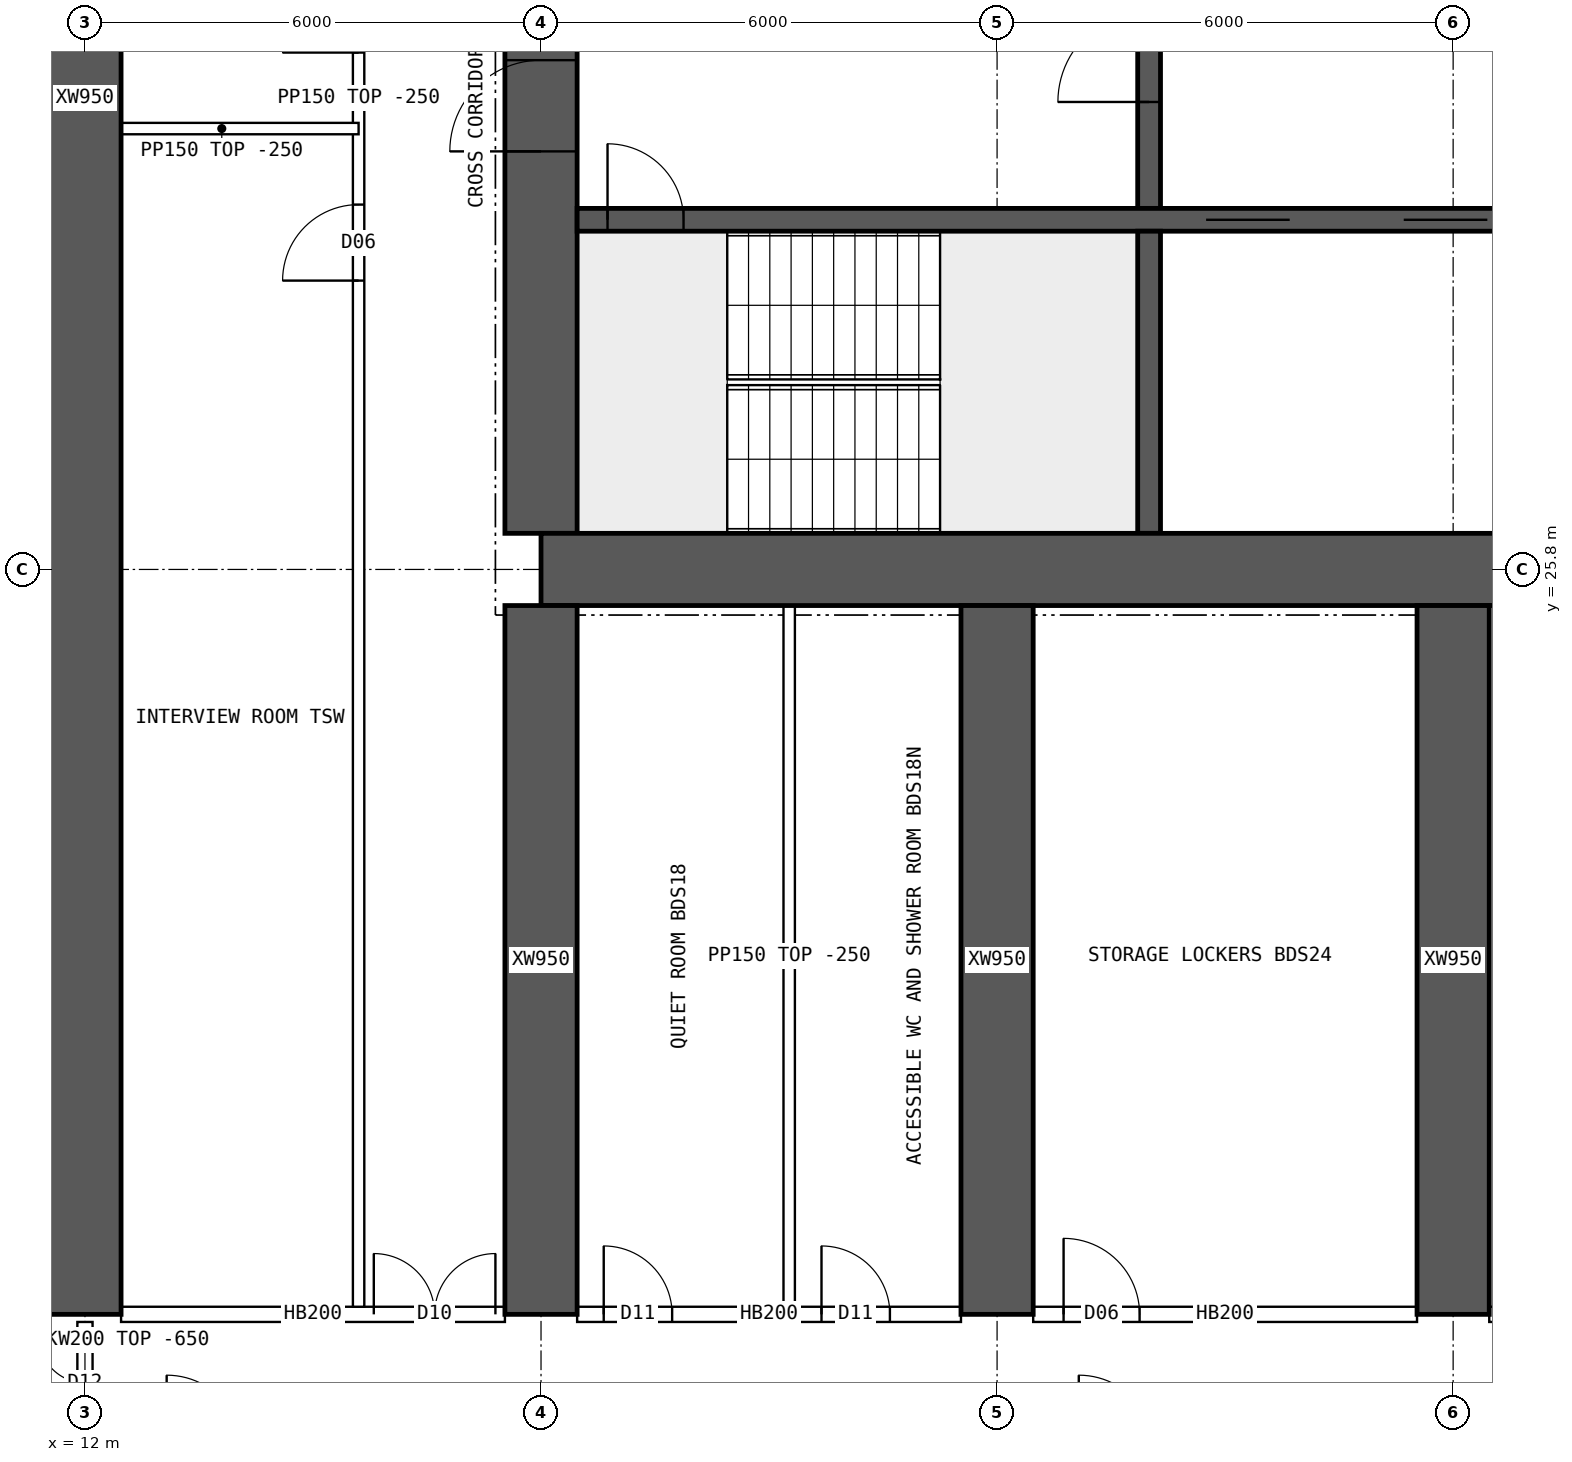
"""IFC4 building model, lengths in metres.
Left out: names, types, materials, properties, quantities, classifications, styles, units other than length and angle.
Written with IfcOpenShell. Run it as: python <this file> out.ifc"""

import sys

from ifc_helpers import new_model, si_unit, direction, frame, frame_2d, origin, place, context, subcontext, project, spatial, polyline, rectangle, outline, extrude, element, fill, save


model = new_model("IFC4")
c1 = context("Model", 3, precision=1e-05, world=origin(), true_north=direction((0.0, 1.0)))
c2 = subcontext(c1, "Body", "Model", "MODEL_VIEW")
j1 = project(units=[si_unit("LENGTHUNIT", "METRE"), si_unit("PLANEANGLEUNIT", "RADIAN")], contexts=[c1])
p1 = place(None, origin())
s1 = spatial("IfcSite", under=j1, at=p1, CompositionType="ELEMENT")
p2 = place(p1, origin())
s2 = spatial("IfcBuilding", under=s1, at=p2, CompositionType="ELEMENT")
p3 = place(p2, frame((0.0, 0.0, 125.65)))
s3 = spatial("IfcBuildingStorey", under=s2, at=p3, CompositionType="ELEMENT", Elevation=125.65)
p4 = place(p3, frame((18.0, 25.8, 0.0), z_axis=(0.0, 0.0, 1.0), x_axis=(1.0, 0.0, 0.0)))
e1 = element("IfcWall", 1, at=p4, inside=s3, PredefinedType="SHEAR", context=c2, shape_type="SweptSolid", body=[
    extrude(rectangle(XDim=48.0, YDim=0.95, at=frame_2d((24.0, 0.0))), origin(), (0.0, 0.0, 1.0), 3.75),
])
p5 = place(p3, frame((18.0, 26.275, 0.0), z_axis=(0.0, 0.0, 1.0), x_axis=(0.0, 1.0, 0.0)))
e2 = element("IfcWall", 2, at=p5, inside=s3, PredefinedType="SHEAR", context=c2, shape_type="SweptSolid", body=[
    extrude(rectangle(XDim=11.45, YDim=0.95, at=frame_2d((5.725, 0.0))), origin(), (0.0, 0.0, 1.0), 3.75),
])
p6 = place(p5, frame((5.025, 0.0, 0.0)))
e3 = element("IfcOpeningElement", 3, at=p6, cuts=e2, PredefinedType="OPENING", context=c2, shape_type="SweptSolid", body=[
    extrude(rectangle(XDim=1.2, YDim=2.1, at=frame_2d((0.6, 1.05))), frame((0.0, 0.485, 0.0), z_axis=(0.0, -1.0, 0.0), x_axis=(1.0, 0.0, 0.0)), (0.0, 0.0, 1.0), 0.97),
])
p7 = place(p3, frame((18.475, 30.4, 0.0), z_axis=(0.0, 0.0, 1.0), x_axis=(1.0, 0.0, 0.0)))
e4 = element("IfcWall", 4, at=p7, inside=s3, PredefinedType="SHEAR", context=c2, shape_type="SweptSolid", body=[
    extrude(rectangle(XDim=47.05, YDim=0.3, at=frame_2d((23.525, 0.0))), origin(), (0.0, 0.0, 1.0), 3.75),
])
p8 = place(p7, frame((0.4, 0.0, 0.0)))
e5 = element("IfcOpeningElement", 5, at=p8, cuts=e4, PredefinedType="OPENING", context=c2, shape_type="SweptSolid", body=[
    extrude(rectangle(XDim=1.0, YDim=2.1, at=frame_2d((0.5, 1.05))), frame((0.0, 0.16, 0.0), z_axis=(0.0, -1.0, 0.0), x_axis=(1.0, 0.0, 0.0)), (0.0, 0.0, 1.0), 0.32),
])
p9 = place(p7, frame((45.65, 0.0, 0.0)))
e6 = element("IfcOpeningElement", 6, at=p9, cuts=e4, PredefinedType="OPENING", context=c2, shape_type="SweptSolid", body=[
    extrude(rectangle(XDim=1.0, YDim=2.1, at=frame_2d((0.5, 1.05))), frame((0.0, 0.16, 0.0), z_axis=(0.0, -1.0, 0.0), x_axis=(1.0, 0.0, 0.0)), (0.0, 0.0, 1.0), 0.32),
])
p10 = place(p7, frame((8.275, 0.0, 0.0)))
e7 = element("IfcOpeningElement", 7, at=p10, cuts=e4, PredefinedType="OPENING", context=c2, shape_type="SweptSolid", body=[
    extrude(rectangle(XDim=1.1, YDim=2.1, at=frame_2d((0.55, 1.05))), frame((0.0, 0.16, 0.0), z_axis=(0.0, -1.0, 0.0), x_axis=(1.0, 0.0, 0.0)), (0.0, 0.0, 1.0), 0.32),
])
p11 = place(p7, frame((10.875, 0.0, 0.0)))
e8 = element("IfcOpeningElement", 8, at=p11, cuts=e4, PredefinedType="OPENING", context=c2, shape_type="SweptSolid", body=[
    extrude(rectangle(XDim=1.1, YDim=2.1, at=frame_2d((0.55, 1.05))), frame((0.0, 0.16, 0.0), z_axis=(0.0, -1.0, 0.0), x_axis=(1.0, 0.0, 0.0)), (0.0, 0.0, 1.0), 0.32),
])
p12 = place(p7, frame((13.475, 0.0, 0.0)))
e9 = element("IfcOpeningElement", 9, at=p12, cuts=e4, PredefinedType="OPENING", context=c2, shape_type="SweptSolid", body=[
    extrude(rectangle(XDim=1.1, YDim=2.1, at=frame_2d((0.55, 1.05))), frame((0.0, 0.16, 0.0), z_axis=(0.0, -1.0, 0.0), x_axis=(1.0, 0.0, 0.0)), (0.0, 0.0, 1.0), 0.32),
])
p13 = place(p7, frame((16.075, 0.0, 0.0)))
e10 = element("IfcOpeningElement", 10, at=p13, cuts=e4, PredefinedType="OPENING", context=c2, shape_type="SweptSolid", body=[
    extrude(rectangle(XDim=1.1, YDim=2.1, at=frame_2d((0.55, 1.05))), frame((0.0, 0.16, 0.0), z_axis=(0.0, -1.0, 0.0), x_axis=(1.0, 0.0, 0.0)), (0.0, 0.0, 1.0), 0.32),
])
p14 = place(p7, frame((18.85, 0.0, 0.0)))
e11 = element("IfcOpeningElement", 11, at=p14, cuts=e4, PredefinedType="OPENING", context=c2, shape_type="SweptSolid", body=[
    extrude(rectangle(XDim=0.9, YDim=2.1, at=frame_2d((0.45, 1.05))), frame((0.0, 0.16, 0.0), z_axis=(0.0, -1.0, 0.0), x_axis=(1.0, 0.0, 0.0)), (0.0, 0.0, 1.0), 0.32),
])
p15 = place(p7, frame((30.142, 0.0, 0.0)))
e12 = element("IfcOpeningElement", 12, at=p15, cuts=e4, PredefinedType="OPENING", context=c2, shape_type="SweptSolid", body=[
    extrude(rectangle(XDim=1.1, YDim=2.1, at=frame_2d((0.55, 1.05))), frame((0.0, 0.16, 0.0), z_axis=(0.0, -1.0, 0.0), x_axis=(1.0, 0.0, 0.0)), (0.0, 0.0, 1.0), 0.32),
])
p16 = place(p7, frame((33.675, 0.0, 0.0)))
e13 = element("IfcOpeningElement", 13, at=p16, cuts=e4, PredefinedType="OPENING", context=c2, shape_type="SweptSolid", body=[
    extrude(rectangle(XDim=1.1, YDim=2.1, at=frame_2d((0.55, 1.05))), frame((0.0, 0.16, 0.0), z_axis=(0.0, -1.0, 0.0), x_axis=(1.0, 0.0, 0.0)), (0.0, 0.0, 1.0), 0.32),
])
p17 = place(p7, frame((37.208, 0.0, 0.0)))
e14 = element("IfcOpeningElement", 14, at=p17, cuts=e4, PredefinedType="OPENING", context=c2, shape_type="SweptSolid", body=[
    extrude(rectangle(XDim=1.1, YDim=2.1, at=frame_2d((0.55, 1.05))), frame((0.0, 0.16, 0.0), z_axis=(0.0, -1.0, 0.0), x_axis=(1.0, 0.0, 0.0)), (0.0, 0.0, 1.0), 0.32),
])
p18 = place(p3, frame((26.0, 26.275, 0.0), z_axis=(0.0, 0.0, 1.0), x_axis=(0.0, 1.0, 0.0)))
e15 = element("IfcWall", 15, at=p18, inside=s3, PredefinedType="SHEAR", context=c2, shape_type="SweptSolid", body=[
    extrude(rectangle(XDim=3.975, YDim=0.3, at=frame_2d((1.988, 0.0))), origin(), (0.0, 0.0, 1.0), 3.75),
])
p19 = place(p3, frame((26.0, 30.55, 0.0), z_axis=(0.0, 0.0, 1.0), x_axis=(0.0, 1.0, 0.0)))
e16 = element("IfcWall", 16, at=p19, inside=s3, PredefinedType="SHEAR", context=c2, shape_type="SweptSolid", body=[
    extrude(rectangle(XDim=3.9, YDim=0.3, at=frame_2d((1.95, 0.0))), origin(), (0.0, 0.0, 1.0), 3.75),
])
p20 = place(p19, frame((1.4, 0.0, 0.0)))
e17 = element("IfcOpeningElement", 17, at=p20, cuts=e16, PredefinedType="OPENING", context=c2, shape_type="SweptSolid", body=[
    extrude(rectangle(XDim=1.2, YDim=2.1, at=frame_2d((0.6, 1.05))), frame((0.0, 0.16, 0.0), z_axis=(0.0, -1.0, 0.0), x_axis=(1.0, 0.0, 0.0)), (0.0, 0.0, 1.0), 0.32),
])
p21 = place(p3, frame((12.0, 16.0, 0.0), z_axis=(0.0, 0.0, 1.0), x_axis=(0.0, 1.0, 0.0)))
e18 = element("IfcWall", 18, at=p21, inside=s3, PredefinedType="SHEAR", context=c2, shape_type="SweptSolid", body=[
    extrude(rectangle(XDim=32.0, YDim=0.95, at=frame_2d((16.0, 0.0))), origin(), (0.0, 0.0, 1.0), 3.75),
])
for number, where, z_axis, x_axis in (
    (19, (18.0, 16.0, 0.0), (0.0, 0.0, 1.0), (0.0, 1.0, 0.0)),
    (20, (24.0, 16.0, 0.0), (0.0, 0.0, 1.0), (0.0, 1.0, 0.0)),
    (21, (30.0, 16.0, 0.0), (0.0, 0.0, 1.0), (0.0, 1.0, 0.0)),
):
    element("IfcWall", number, at=place(p3, frame(where, z_axis=z_axis, x_axis=x_axis)), inside=s3, PredefinedType="SHEAR", context=c2, shape_type="SweptSolid", body=[
        extrude(rectangle(XDim=9.325, YDim=0.95, at=frame_2d((4.663, 0.0))), origin(), (0.0, 0.0, 1.0), 3.75),
    ])
p22 = place(p3, frame((12.475, 16.0, 0.0), z_axis=(0.0, 0.0, 1.0), x_axis=(1.0, 0.0, 0.0)))
e22 = element("IfcWall", 22, at=p22, inside=s3, PredefinedType="SOLIDWALL", context=c2, shape_type="SweptSolid", body=[
    extrude(rectangle(XDim=5.05, YDim=0.2, at=frame_2d((2.525, 0.0))), origin(), (0.0, 0.0, 1.0), 3.5),
])
p23 = place(p22, frame((3.325, 0.0, 0.0)))
e23 = element("IfcOpeningElement", 23, at=p23, cuts=e22, PredefinedType="OPENING", context=c2, shape_type="SweptSolid", body=[
    extrude(rectangle(XDim=1.6, YDim=2.1, at=frame_2d((0.8, 1.05))), frame((0.0, 0.11, 0.0), z_axis=(0.0, -1.0, 0.0), x_axis=(1.0, 0.0, 0.0)), (0.0, 0.0, 1.0), 0.22),
])
p24 = place(p3, frame((18.475, 16.0, 0.0), z_axis=(0.0, 0.0, 1.0), x_axis=(1.0, 0.0, 0.0)))
e24 = element("IfcWall", 24, at=p24, inside=s3, PredefinedType="SOLIDWALL", context=c2, shape_type="SweptSolid", body=[
    extrude(rectangle(XDim=5.05, YDim=0.2, at=frame_2d((2.525, 0.0))), origin(), (0.0, 0.0, 1.0), 3.5),
])
p25 = place(p24, frame((0.35, 0.0, 0.0)))
e25 = element("IfcOpeningElement", 25, at=p25, cuts=e24, PredefinedType="OPENING", context=c2, shape_type="SweptSolid", body=[
    extrude(rectangle(XDim=0.9, YDim=2.1, at=frame_2d((0.45, 1.05))), frame((0.0, 0.11, 0.0), z_axis=(0.0, -1.0, 0.0), x_axis=(1.0, 0.0, 0.0)), (0.0, 0.0, 1.0), 0.22),
])
p26 = place(p24, frame((3.215, 0.0, 0.0)))
e26 = element("IfcOpeningElement", 26, at=p26, cuts=e24, PredefinedType="OPENING", context=c2, shape_type="SweptSolid", body=[
    extrude(rectangle(XDim=0.9, YDim=2.1, at=frame_2d((0.45, 1.05))), frame((0.0, 0.11, 0.0), z_axis=(0.0, -1.0, 0.0), x_axis=(1.0, 0.0, 0.0)), (0.0, 0.0, 1.0), 0.22),
])
p27 = place(p3, frame((24.475, 16.0, 0.0), z_axis=(0.0, 0.0, 1.0), x_axis=(1.0, 0.0, 0.0)))
e27 = element("IfcWall", 27, at=p27, inside=s3, PredefinedType="SOLIDWALL", context=c2, shape_type="SweptSolid", body=[
    extrude(rectangle(XDim=5.05, YDim=0.2, at=frame_2d((2.525, 0.0))), origin(), (0.0, 0.0, 1.0), 3.5),
])
p28 = place(p27, frame((0.4, 0.0, 0.0)))
e28 = element("IfcOpeningElement", 28, at=p28, cuts=e27, PredefinedType="OPENING", context=c2, shape_type="SweptSolid", body=[
    extrude(rectangle(XDim=1.0, YDim=2.1, at=frame_2d((0.5, 1.05))), frame((0.0, 0.11, 0.0), z_axis=(0.0, -1.0, 0.0), x_axis=(1.0, 0.0, 0.0)), (0.0, 0.0, 1.0), 0.22),
])
p29 = place(p3, frame((30.475, 16.0, 0.0), z_axis=(0.0, 0.0, 1.0), x_axis=(1.0, 0.0, 0.0)))
e29 = element("IfcWall", 29, at=p29, inside=s3, PredefinedType="SOLIDWALL", context=c2, shape_type="SweptSolid", body=[
    extrude(rectangle(XDim=5.05, YDim=0.2, at=frame_2d((2.525, 0.0))), origin(), (0.0, 0.0, 1.0), 3.5),
])
p30 = place(p29, frame((0.35, 0.0, 0.0)))
e30 = element("IfcOpeningElement", 30, at=p30, cuts=e29, PredefinedType="OPENING", context=c2, shape_type="SweptSolid", body=[
    extrude(rectangle(XDim=0.9, YDim=2.1, at=frame_2d((0.45, 1.05))), frame((0.0, 0.11, 0.0), z_axis=(0.0, -1.0, 0.0), x_axis=(1.0, 0.0, 0.0)), (0.0, 0.0, 1.0), 0.22),
])
p31 = place(p29, frame((2.655, 0.0, 0.0)))
e31 = element("IfcOpeningElement", 31, at=p31, cuts=e29, PredefinedType="OPENING", context=c2, shape_type="SweptSolid", body=[
    extrude(rectangle(XDim=0.9, YDim=2.1, at=frame_2d((0.45, 1.05))), frame((0.0, 0.11, 0.0), z_axis=(0.0, -1.0, 0.0), x_axis=(1.0, 0.0, 0.0)), (0.0, 0.0, 1.0), 0.22),
])
p32 = place(p3, frame((21.265, 16.1, 0.0), z_axis=(0.0, 0.0, 1.0), x_axis=(0.0, 1.0, 0.0)))
e32 = element("IfcWall", 32, at=p32, inside=s3, PredefinedType="PARTITIONING", context=c2, shape_type="SweptSolid", body=[
    extrude(rectangle(XDim=9.225, YDim=0.15, at=frame_2d((4.612, 0.0))), origin(), (0.0, 0.0, 1.0), 3.5),
])
p33 = place(p3, frame((15.6, 16.1, 0.0), z_axis=(0.0, 0.0, 1.0), x_axis=(0.0, 1.0, 0.0)))
e33 = element("IfcWall", 33, at=p33, inside=s3, PredefinedType="PARTITIONING", context=c2, shape_type="SweptSolid", body=[
    extrude(rectangle(XDim=31.8, YDim=0.15, at=frame_2d((15.9, 0.0))), origin(), (0.0, 0.0, 1.0), 3.5),
])
p34 = place(p33, frame((13.5, 0.0, 0.0)))
e34 = element("IfcOpeningElement", 34, at=p34, cuts=e33, PredefinedType="OPENING", context=c2, shape_type="SweptSolid", body=[
    extrude(rectangle(XDim=1.0, YDim=2.1, at=frame_2d((0.5, 1.05))), frame((0.0, 0.085, 0.0), z_axis=(0.0, -1.0, 0.0), x_axis=(1.0, 0.0, 0.0)), (0.0, 0.0, 1.0), 0.17),
])
p35 = place(p33, frame((16.5, 0.0, 0.0)))
e35 = element("IfcOpeningElement", 35, at=p35, cuts=e33, PredefinedType="OPENING", context=c2, shape_type="SweptSolid", body=[
    extrude(rectangle(XDim=1.0, YDim=2.1, at=frame_2d((0.5, 1.05))), frame((0.0, 0.085, 0.0), z_axis=(0.0, -1.0, 0.0), x_axis=(1.0, 0.0, 0.0)), (0.0, 0.0, 1.0), 0.17),
])
p36 = place(p3, frame((12.0, 31.6, 0.0), z_axis=(0.0, 0.0, 1.0), x_axis=(1.0, 0.0, 0.0)))
e36 = element("IfcWall", 36, at=p36, inside=s3, PredefinedType="PARTITIONING", context=c2, shape_type="SweptSolid", body=[
    extrude(rectangle(XDim=3.6, YDim=0.15, at=frame_2d((1.8, 0.0))), origin(), (0.0, 0.0, 1.0), 3.5),
])
p37 = place(p3, frame((3.905, 30.85, 0.0), z_axis=(0.0, 0.0, 1.0), x_axis=(1.0, 0.0, 0.0)))
e37 = element("IfcWall", 37, at=p37, inside=s3, PredefinedType="PARTITIONING", context=c2, shape_type="SweptSolid", body=[
    extrude(outline(polyline([(0.0, 0.0), (8.02, 0.0), (8.02, 3.5), (2.397, 3.5), (2.395, 3.05), (1.797, 3.05), (1.795, 3.5), (0.0, 3.5), (0.0, 0.0)])), frame((0.0, 0.075, 0.0), z_axis=(0.0, -1.0, 0.0), x_axis=(1.0, 0.0, 0.0)), (0.0, 0.0, 1.0), 0.15),
])
p38 = place(p3, frame((12.0, 14.3, 0.0), z_axis=(0.0, 0.0, 1.0), x_axis=(0.0, 1.0, 0.0)))
e38 = element("IfcWall", 38, at=p38, inside=s3, PredefinedType="SOLIDWALL", context=c2, shape_type="SweptSolid", body=[
    extrude(outline(polyline([(0.0, 0.0), (1.6, 0.0), (1.6, 3.1), (0.0, 3.1), (0.0, 0.0)])), frame((0.0, 0.1, 0.0), z_axis=(0.0, -1.0, 0.0), x_axis=(1.0, 0.0, 0.0)), (0.0, 0.0, 1.0), 0.2),
])
p39 = place(p38, frame((0.2, 0.0, 0.0)))
e39 = element("IfcOpeningElement", 39, at=p39, cuts=e38, PredefinedType="OPENING", context=c2, shape_type="SweptSolid", body=[
    extrude(rectangle(XDim=1.2, YDim=2.1, at=frame_2d((0.6, 1.05))), frame((0.0, 0.11, 0.0), z_axis=(0.0, -1.0, 0.0), x_axis=(1.0, 0.0, 0.0)), (0.0, 0.0, 1.0), 0.22),
])
p40 = place(p6, origin())
e40 = element("IfcDoor", 40, at=p40, inside=s3, OperationType="SINGLE_SWING_LEFT", PredefinedType="DOOR", context=c2, shape_type="SweptSolid", body=[
    extrude(rectangle(XDim=1.2, YDim=2.1, at=frame_2d((0.6, 1.05))), frame((0.0, 0.025, 0.0), z_axis=(0.0, -1.0, 0.0), x_axis=(1.0, 0.0, 0.0)), (0.0, 0.0, 1.0), 0.05),
])
fill(e3, e40)
p41 = place(p8, origin())
e41 = element("IfcDoor", 41, at=p41, inside=s3, OperationType="SINGLE_SWING_LEFT", PredefinedType="DOOR", context=c2, shape_type="SweptSolid", body=[
    extrude(rectangle(XDim=1.0, YDim=2.1, at=frame_2d((0.5, 1.05))), frame((0.0, 0.025, 0.0), z_axis=(0.0, -1.0, 0.0), x_axis=(1.0, 0.0, 0.0)), (0.0, 0.0, 1.0), 0.05),
])
fill(e5, e41)
p42 = place(p20, origin())
e42 = element("IfcDoor", 42, at=p42, inside=s3, OperationType="SINGLE_SWING_LEFT", PredefinedType="DOOR", context=c2, shape_type="SweptSolid", body=[
    extrude(rectangle(XDim=1.2, YDim=2.1, at=frame_2d((0.6, 1.05))), frame((0.0, 0.025, 0.0), z_axis=(0.0, -1.0, 0.0), x_axis=(1.0, 0.0, 0.0)), (0.0, 0.0, 1.0), 0.05),
])
fill(e17, e42)
p43 = place(p10, origin())
e43 = element("IfcDoor", 43, at=p43, inside=s3, OperationType="DOUBLE_DOOR_SLIDING", PredefinedType="DOOR", context=c2, shape_type="SweptSolid", body=[
    extrude(rectangle(XDim=1.1, YDim=2.1, at=frame_2d((0.55, 1.05))), frame((0.0, 0.025, 0.0), z_axis=(0.0, -1.0, 0.0), x_axis=(1.0, 0.0, 0.0)), (0.0, 0.0, 1.0), 0.05),
])
fill(e7, e43)
p44 = place(p11, origin())
e44 = element("IfcDoor", 44, at=p44, inside=s3, OperationType="DOUBLE_DOOR_SLIDING", PredefinedType="DOOR", context=c2, shape_type="SweptSolid", body=[
    extrude(rectangle(XDim=1.1, YDim=2.1, at=frame_2d((0.55, 1.05))), frame((0.0, 0.025, 0.0), z_axis=(0.0, -1.0, 0.0), x_axis=(1.0, 0.0, 0.0)), (0.0, 0.0, 1.0), 0.05),
])
fill(e8, e44)
p45 = place(p23, origin())
e45 = element("IfcDoor", 45, at=p45, inside=s3, OperationType="DOUBLE_DOOR_SINGLE_SWING", PredefinedType="DOOR", context=c2, shape_type="SweptSolid", body=[
    extrude(rectangle(XDim=1.6, YDim=2.1, at=frame_2d((0.8, 1.05))), frame((0.0, 0.025, 0.0), z_axis=(0.0, -1.0, 0.0), x_axis=(1.0, 0.0, 0.0)), (0.0, 0.0, 1.0), 0.05),
])
fill(e23, e45)
p46 = place(p25, origin())
e46 = element("IfcDoor", 46, at=p46, inside=s3, OperationType="SINGLE_SWING_LEFT", PredefinedType="DOOR", context=c2, shape_type="SweptSolid", body=[
    extrude(rectangle(XDim=0.9, YDim=2.1, at=frame_2d((0.45, 1.05))), frame((0.0, 0.025, 0.0), z_axis=(0.0, -1.0, 0.0), x_axis=(1.0, 0.0, 0.0)), (0.0, 0.0, 1.0), 0.05),
])
fill(e25, e46)
p47 = place(p26, origin())
e47 = element("IfcDoor", 47, at=p47, inside=s3, OperationType="SINGLE_SWING_LEFT", PredefinedType="DOOR", context=c2, shape_type="SweptSolid", body=[
    extrude(rectangle(XDim=0.9, YDim=2.1, at=frame_2d((0.45, 1.05))), frame((0.0, 0.025, 0.0), z_axis=(0.0, -1.0, 0.0), x_axis=(1.0, 0.0, 0.0)), (0.0, 0.0, 1.0), 0.05),
])
fill(e26, e47)
p48 = place(p28, origin())
e48 = element("IfcDoor", 48, at=p48, inside=s3, OperationType="SINGLE_SWING_LEFT", PredefinedType="DOOR", context=c2, shape_type="SweptSolid", body=[
    extrude(rectangle(XDim=1.0, YDim=2.1, at=frame_2d((0.5, 1.05))), frame((0.0, 0.025, 0.0), z_axis=(0.0, -1.0, 0.0), x_axis=(1.0, 0.0, 0.0)), (0.0, 0.0, 1.0), 0.05),
])
fill(e28, e48)
p49 = place(p34, origin())
e49 = element("IfcDoor", 49, at=p49, inside=s3, OperationType="SINGLE_SWING_LEFT", PredefinedType="DOOR", context=c2, shape_type="SweptSolid", body=[
    extrude(rectangle(XDim=1.0, YDim=2.1, at=frame_2d((0.5, 1.05))), frame((0.0, 0.025, 0.0), z_axis=(0.0, -1.0, 0.0), x_axis=(1.0, 0.0, 0.0)), (0.0, 0.0, 1.0), 0.05),
])
fill(e34, e49)
p50 = place(p39, origin())
e50 = element("IfcDoor", 50, at=p50, inside=s3, OperationType="DOUBLE_DOOR_SINGLE_SWING", PredefinedType="DOOR", context=c2, shape_type="SweptSolid", body=[
    extrude(rectangle(XDim=1.2, YDim=2.1, at=frame_2d((0.6, 1.05))), frame((0.0, 0.025, 0.0), z_axis=(0.0, -1.0, 0.0), x_axis=(1.0, 0.0, 0.0)), (0.0, 0.0, 1.0), 0.05),
])
fill(e39, e50)
save(model, sys.argv[1])
